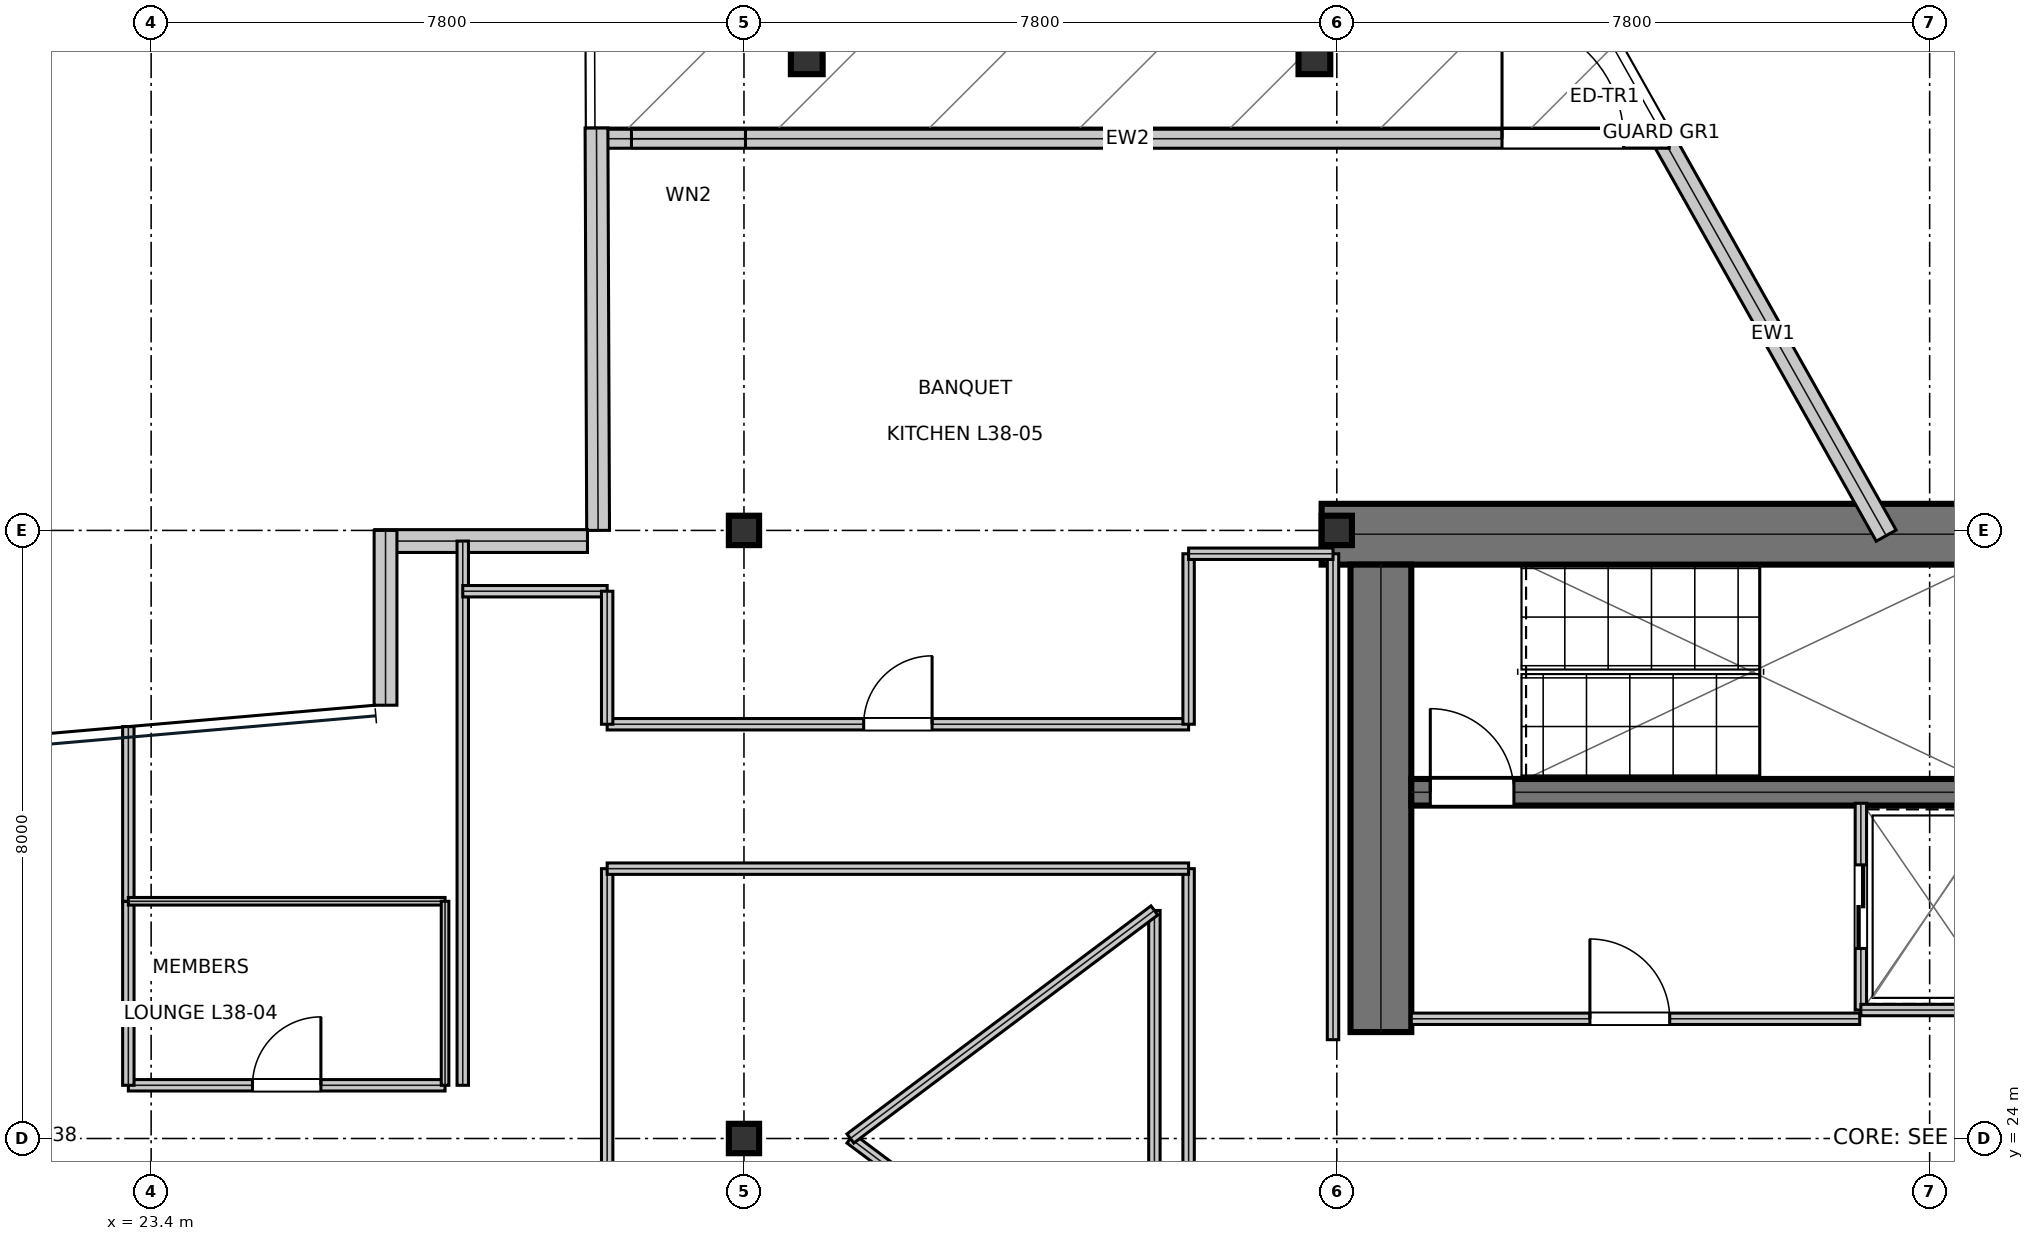
"""IFC4 building model, lengths in metres.
Left out: names, types, materials, properties, quantities, classifications, styles, units other than length and angle.
Written with IfcOpenShell. Run it as: python <this file> out.ifc"""

import sys

from ifc_helpers import new_model, si_unit, direction, frame, frame_2d, origin, origin_2d, place, context, subcontext, project, spatial, rectangle, i_section, extrude, element, fill, save


model = new_model("IFC4")
c1 = context("Model", 3, precision=1e-05, world=origin(), true_north=direction((0.0, 1.0)))
c2 = subcontext(c1, "Body", "Model", "MODEL_VIEW")
j1 = project(units=[si_unit("LENGTHUNIT", "METRE"), si_unit("PLANEANGLEUNIT", "RADIAN")], contexts=[c1])
p1 = place(None, origin())
s1 = spatial("IfcSite", under=j1, at=p1, CompositionType="ELEMENT")
p2 = place(p1, origin())
s2 = spatial("IfcBuilding", under=s1, at=p2, CompositionType="ELEMENT")
p3 = place(p2, frame((0.0, 0.0, 165.45)))
s3 = spatial("IfcBuildingStorey", under=s2, at=p3, CompositionType="ELEMENT", Elevation=165.45)
p4 = place(p3, frame((38.8, 31.95, 0.0), z_axis=(0.0, 0.0, 1.0), x_axis=(1.0, 0.0, 0.0)))
e1 = element("IfcWall", 1, at=p4, inside=s3, PredefinedType="SHEAR", context=c2, shape_type="SweptSolid", body=[
    extrude(rectangle(XDim=16.0, YDim=0.8, at=frame_2d((8.0, 0.0))), origin(), (0.0, 0.0, 1.0), 3.81),
])
p5 = place(p3, frame((39.58, 25.4, 0.0), z_axis=(0.0, 0.0, 1.0), x_axis=(0.0, 1.0, 0.0)))
e2 = element("IfcWall", 2, at=p5, inside=s3, PredefinedType="SHEAR", context=c2, shape_type="SweptSolid", body=[
    extrude(rectangle(XDim=6.15, YDim=0.8, at=frame_2d((3.075, 0.0))), origin(), (0.0, 0.0, 1.0), 3.81),
])
p6 = place(p3, frame((39.98, 28.555, 0.0), z_axis=(0.0, 0.0, 1.0), x_axis=(1.0, 0.0, 0.0)))
e3 = element("IfcWall", 3, at=p6, inside=s3, PredefinedType="SHEAR", context=c2, shape_type="SweptSolid", body=[
    extrude(rectangle(XDim=7.71, YDim=0.35, at=frame_2d((3.855, 0.0))), origin(), (0.0, 0.0, 1.0), 3.81),
])
p7 = place(p6, frame((0.25, 0.0, 0.0)))
e4 = element("IfcOpeningElement", 4, at=p7, cuts=e3, PredefinedType="OPENING", context=c2, shape_type="SweptSolid", body=[
    extrude(rectangle(XDim=1.1, YDim=2.15, at=frame_2d((0.55, 1.075))), frame((0.0, 0.185, 0.0), z_axis=(0.0, -1.0, 0.0), x_axis=(1.0, 0.0, 0.0)), (0.0, 0.0, 1.0), 0.37),
])
for number, where, z_axis, x_axis in (
    (5, (31.2, 24.0, 0.0), (0.0, 0.0, 1.0), (1.0, 0.0, 0.0)),
    (6, (31.2, 32.0, 0.0), (0.0, 0.0, 1.0), (1.0, 0.0, 0.0)),
    (7, (39.0, 32.0, 0.0), (0.0, 0.0, 1.0), (1.0, 0.0, 0.0)),
):
    element("IfcColumn", number, at=place(p3, frame(where, z_axis=z_axis, x_axis=x_axis)), inside=s3, PredefinedType="COLUMN", context=c2, shape_type="SweptSolid", body=[
        extrude(i_section(OverallWidth=0.398, OverallDepth=0.387, WebThickness=0.021, FlangeThickness=0.033, at=origin_2d()), origin(), (0.0, 0.0, 1.0), 4.044),
    ])
p8 = place(p3, frame((32.026, 38.23, 0.016), z_axis=(0.013968236766, -0.029819148922, 0.999457706318), x_axis=(0.905569653976, 0.424197597586, 0.0)))
e8 = element("IfcColumn", 8, at=p8, inside=s3, PredefinedType="COLUMN", context=c2, shape_type="SweptSolid", body=[
    extrude(i_section(OverallWidth=0.418, OverallDepth=0.455, WebThickness=0.042, FlangeThickness=0.068, at=origin_2d()), origin(), (0.0, 0.0, 1.0), 4.02),
])
p9 = place(p3, frame((38.705, 38.23, 0.016), z_axis=(-0.004980404192, -0.029821688517, 0.99954282673), x_axis=(0.986339577116, -0.164724735893, 0.0)))
e9 = element("IfcColumn", 9, at=p9, inside=s3, PredefinedType="COLUMN", context=c2, shape_type="SweptSolid", body=[
    extrude(i_section(OverallWidth=0.418, OverallDepth=0.455, WebThickness=0.042, FlangeThickness=0.068, at=origin_2d()), origin(), (0.0, 0.0, 1.0), 4.02),
])
p10 = place(p3, frame((46.228, 31.931, 0.0), z_axis=(0.0, 0.0, 1.0), x_axis=(-0.490139068903, 0.871644246889, 0.0)))
e10 = element("IfcWall", 10, at=p10, inside=s3, PredefinedType="STANDARD", context=c2, shape_type="SweptSolid", body=[
    extrude(rectangle(XDim=6.073, YDim=0.3, at=frame_2d((3.036, 0.0))), origin(), (0.0, 0.0, 1.0), 3.338),
])
p11 = place(p3, frame((43.374, 37.153, 0.0), z_axis=(0.0, 0.0, 1.0), x_axis=(-1.0, 0.0, 0.0)))
e11 = element("IfcWall", 11, at=p11, inside=s3, PredefinedType="STANDARD", context=c2, shape_type="SweptSolid", body=[
    extrude(rectangle(XDim=14.254, YDim=0.25, at=frame_2d((7.127, 0.0))), origin(), (0.0, 0.0, 1.0), 3.19),
])
p12 = place(p11, frame((0.6, 0.0, 0.0)))
e12 = element("IfcOpeningElement", 12, at=p12, cuts=e11, PredefinedType="OPENING", context=c2, shape_type="SweptSolid", body=[
    extrude(rectangle(XDim=1.6, YDim=2.2, at=frame_2d((0.8, 1.1))), frame((0.0, 0.135, 0.0), z_axis=(0.0, -1.0, 0.0), x_axis=(1.0, 0.0, 0.0)), (0.0, 0.0, 1.0), 0.27),
])
p13 = place(p11, frame((12.154, 0.0, 0.95)))
e13 = element("IfcOpeningElement", 13, at=p13, cuts=e11, PredefinedType="OPENING", context=c2, shape_type="SweptSolid", body=[
    extrude(rectangle(XDim=1.5, YDim=1.6, at=frame_2d((0.75, 0.8))), frame((0.0, 0.135, 0.0), z_axis=(0.0, -1.0, 0.0), x_axis=(1.0, 0.0, 0.0)), (0.0, 0.0, 1.0), 0.27),
])
p14 = place(p3, frame((29.26, 37.294, 0.0), z_axis=(0.0, 0.0, 1.0), x_axis=(0.004012697734, -0.999991949096, 0.0)))
e14 = element("IfcWall", 14, at=p14, inside=s3, PredefinedType="STANDARD", context=c2, shape_type="SweptSolid", body=[
    extrude(rectangle(XDim=5.293, YDim=0.3, at=frame_2d((2.646, 0.0))), origin(), (0.0, 0.0, 1.0), 3.81),
])
p15 = place(p3, frame((29.141, 31.86, 0.0), z_axis=(0.0, 0.0, 1.0), x_axis=(-1.0, 0.0, 0.0)))
e15 = element("IfcWall", 15, at=p15, inside=s3, PredefinedType="STANDARD", context=c2, shape_type="SweptSolid", body=[
    extrude(rectangle(XDim=2.797, YDim=0.3, at=frame_2d((1.398, 0.0))), origin(), (0.0, 0.0, 1.0), 3.81),
])
p16 = place(p3, frame((26.484, 32.0, 0.0), z_axis=(0.0, 0.0, 1.0), x_axis=(0.0, -1.0, 0.0)))
e16 = element("IfcWall", 16, at=p16, inside=s3, PredefinedType="STANDARD", context=c2, shape_type="SweptSolid", body=[
    extrude(rectangle(XDim=2.3, YDim=0.3, at=frame_2d((1.15, 0.0))), origin(), (0.0, 0.0, 1.0), 3.338),
])
p17 = place(p3, frame((39.98, 25.575, 0.0), z_axis=(0.0, 0.0, 1.0), x_axis=(1.0, 0.0, 0.0)))
e17 = element("IfcWall", 17, at=p17, inside=s3, PredefinedType="PARTITIONING", context=c2, shape_type="SweptSolid", body=[
    extrude(rectangle(XDim=5.9, YDim=0.15, at=frame_2d((2.95, 0.0))), origin(), (0.0, 0.0, 1.0), 3.81),
])
p18 = place(p17, frame((2.35, 0.0, 0.0)))
e18 = element("IfcOpeningElement", 18, at=p18, cuts=e17, PredefinedType="OPENING", context=c2, shape_type="SweptSolid", body=[
    extrude(rectangle(XDim=1.05, YDim=2.15, at=frame_2d((0.525, 1.075))), frame((0.0, 0.085, 0.0), z_axis=(0.0, -1.0, 0.0), x_axis=(1.0, 0.0, 0.0)), (0.0, 0.0, 1.0), 0.17),
])
p19 = place(p3, frame((45.895, 25.69, 0.0), z_axis=(0.0, 0.0, 1.0), x_axis=(0.0, 1.0, 0.0)))
e19 = element("IfcWall", 19, at=p19, inside=s3, PredefinedType="PARTITIONING", context=c2, shape_type="SweptSolid", body=[
    extrude(rectangle(XDim=2.72, YDim=0.15, at=frame_2d((1.36, 0.0))), origin(), (0.0, 0.0, 1.0), 3.81),
])
p20 = place(p19, frame((0.81, 0.0, 0.0)))
e20 = element("IfcOpeningElement", 20, at=p20, cuts=e19, PredefinedType="OPENING", context=c2, shape_type="SweptSolid", body=[
    extrude(rectangle(XDim=1.1, YDim=2.15, at=frame_2d((0.55, 1.075))), frame((0.0, 0.085, 0.0), z_axis=(0.0, -1.0, 0.0), x_axis=(1.0, 0.0, 0.0)), (0.0, 0.0, 1.0), 0.17),
])
p21 = place(p3, frame((45.895, 25.69, 0.0), z_axis=(0.0, 0.0, 1.0), x_axis=(1.0, 0.0, 0.0)))
e21 = element("IfcWall", 21, at=p21, inside=s3, PredefinedType="PARTITIONING", context=c2, shape_type="SweptSolid", body=[
    extrude(rectangle(XDim=1.915, YDim=0.15, at=frame_2d((0.958, 0.0))), origin(), (0.0, 0.0, 1.0), 3.81),
])
p22 = place(p3, frame((37.05, 14.5, 0.0), z_axis=(0.0, 0.0, 1.0), x_axis=(0.0, 1.0, 0.0)))
e22 = element("IfcWall", 22, at=p22, inside=s3, PredefinedType="PARTITIONING", context=c2, shape_type="SweptSolid", body=[
    extrude(rectangle(XDim=13.05, YDim=0.15, at=frame_2d((6.525, 0.0))), origin(), (0.0, 0.0, 1.0), 3.19),
])
p23 = place(p22, frame((4.635, 0.0, 0.0)))
e23 = element("IfcOpeningElement", 23, at=p23, cuts=e22, PredefinedType="OPENING", context=c2, shape_type="SweptSolid", body=[
    extrude(rectangle(XDim=0.9, YDim=2.15, at=frame_2d((0.45, 1.075))), frame((0.0, 0.085, 0.0), z_axis=(0.0, -1.0, 0.0), x_axis=(1.0, 0.0, 0.0)), (0.0, 0.0, 1.0), 0.17),
])
p24 = place(p3, frame((23.1, 24.7, 0.0), z_axis=(0.0, 0.0, 1.0), x_axis=(1.0, 0.0, 0.0)))
e24 = element("IfcWall", 24, at=p24, inside=s3, PredefinedType="PARTITIONING", context=c2, shape_type="SweptSolid", body=[
    extrude(rectangle(XDim=4.167, YDim=0.15, at=frame_2d((2.083, 0.0))), origin(), (0.0, 0.0, 1.0), 3.19),
])
p25 = place(p24, frame((1.634, 0.0, 0.0)))
e25 = element("IfcOpeningElement", 25, at=p25, cuts=e24, PredefinedType="OPENING", context=c2, shape_type="SweptSolid", body=[
    extrude(rectangle(XDim=0.9, YDim=2.15, at=frame_2d((0.45, 1.075))), frame((0.0, 0.085, 0.0), z_axis=(0.0, -1.0, 0.0), x_axis=(1.0, 0.0, 0.0)), (0.0, 0.0, 1.0), 0.17),
])
p26 = place(p3, frame((29.4, 29.45, 0.0), z_axis=(0.0, 0.0, 1.0), x_axis=(1.0, 0.0, 0.0)))
e26 = element("IfcWall", 26, at=p26, inside=s3, PredefinedType="PARTITIONING", context=c2, shape_type="SweptSolid", body=[
    extrude(rectangle(XDim=7.65, YDim=0.15, at=frame_2d((3.825, 0.0))), origin(), (0.0, 0.0, 1.0), 3.19),
])
p27 = place(p26, frame((3.375, 0.0, 0.0)))
e27 = element("IfcOpeningElement", 27, at=p27, cuts=e26, PredefinedType="OPENING", context=c2, shape_type="SweptSolid", body=[
    extrude(rectangle(XDim=0.9, YDim=2.15, at=frame_2d((0.45, 1.075))), frame((0.0, 0.085, 0.0), z_axis=(0.0, -1.0, 0.0), x_axis=(1.0, 0.0, 0.0)), (0.0, 0.0, 1.0), 0.17),
])
p28 = place(p3, frame((29.4, 16.8, 0.0), z_axis=(0.0, 0.0, 1.0), x_axis=(0.0, 1.0, 0.0)))
e28 = element("IfcWall", 28, at=p28, inside=s3, PredefinedType="PARTITIONING", context=c2, shape_type="SweptSolid", body=[
    extrude(rectangle(XDim=10.75, YDim=0.15, at=frame_2d((5.375, 0.0))), origin(), (0.0, 0.0, 1.0), 3.19),
])
p29 = place(p3, frame((29.4, 27.55, 0.0), z_axis=(0.0, 0.0, 1.0), x_axis=(1.0, 0.0, 0.0)))
e29 = element("IfcWall", 29, at=p29, inside=s3, PredefinedType="PARTITIONING", context=c2, shape_type="SweptSolid", body=[
    extrude(rectangle(XDim=7.65, YDim=0.15, at=frame_2d((3.825, 0.0))), origin(), (0.0, 0.0, 1.0), 3.19),
])
p30 = place(p3, frame((23.1, 24.7, 0.0), z_axis=(0.0, 0.0, 1.0), x_axis=(0.0, 1.0, 0.0)))
e30 = element("IfcWall", 30, at=p30, inside=s3, PredefinedType="PARTITIONING", context=c2, shape_type="SweptSolid", body=[
    extrude(rectangle(XDim=2.421, YDim=0.15, at=frame_2d((1.21, 0.0))), origin(), (0.0, 0.0, 1.0), 3.19),
])
p31 = place(p3, frame((27.5, 24.7, 0.0), z_axis=(0.0, 0.0, 1.0), x_axis=(0.0, 1.0, 0.0)))
e31 = element("IfcWall", 31, at=p31, inside=s3, PredefinedType="PARTITIONING", context=c2, shape_type="SweptSolid", body=[
    extrude(rectangle(XDim=7.16, YDim=0.15, at=frame_2d((3.58, 0.0))), origin(), (0.0, 0.0, 1.0), 3.338),
])
p32 = place(p3, frame((38.95, 25.3, 0.0), z_axis=(0.0, 0.0, 1.0), x_axis=(0.0, 1.0, 0.0)))
e32 = element("IfcWall", 32, at=p32, inside=s3, PredefinedType="PARTITIONING", context=c2, shape_type="SweptSolid", body=[
    extrude(rectangle(XDim=6.393, YDim=0.15, at=frame_2d((3.197, 0.0))), origin(), (0.0, 0.0, 1.0), 3.443),
])
p33 = place(p3, frame((23.1, 27.121, 0.0), z_axis=(0.0, 0.0, 1.0), x_axis=(0.0, 1.0, 0.0)))
e33 = element("IfcWall", 33, at=p33, inside=s3, PredefinedType="PARTITIONING", context=c2, shape_type="SweptSolid", body=[
    extrude(rectangle(XDim=2.298, YDim=0.15, at=frame_2d((1.149, 0.0))), origin(), (0.0, 0.0, 1.0), 3.81),
])
p34 = place(p3, frame((37.05, 29.45, 0.0), z_axis=(0.0, 0.0, 1.0), x_axis=(0.0, 1.0, 0.0)))
e34 = element("IfcWall", 34, at=p34, inside=s3, PredefinedType="PARTITIONING", context=c2, shape_type="SweptSolid", body=[
    extrude(rectangle(XDim=2.243, YDim=0.15, at=frame_2d((1.122, 0.0))), origin(), (0.0, 0.0, 1.0), 3.443),
])
p35 = place(p3, frame((37.05, 31.693, 0.0), z_axis=(0.0, 0.0, 1.0), x_axis=(1.0, 0.0, 0.0)))
e35 = element("IfcWall", 35, at=p35, inside=s3, PredefinedType="PARTITIONING", context=c2, shape_type="SweptSolid", body=[
    extrude(rectangle(XDim=1.9, YDim=0.15, at=frame_2d((0.95, 0.0))), origin(), (0.0, 0.0, 1.0), 3.81),
])
p36 = place(p3, frame((27.5, 31.2, 0.0), z_axis=(0.0, 0.0, 1.0), x_axis=(1.0, 0.0, 0.0)))
e36 = element("IfcWall", 36, at=p36, inside=s3, PredefinedType="PARTITIONING", context=c2, shape_type="SweptSolid", body=[
    extrude(rectangle(XDim=1.9, YDim=0.15, at=frame_2d((0.95, 0.0))), origin(), (0.0, 0.0, 1.0), 3.338),
])
p37 = place(p3, frame((29.4, 29.45, 0.0), z_axis=(0.0, 0.0, 1.0), x_axis=(0.0, 1.0, 0.0)))
e37 = element("IfcWall", 37, at=p37, inside=s3, PredefinedType="PARTITIONING", context=c2, shape_type="SweptSolid", body=[
    extrude(rectangle(XDim=1.75, YDim=0.15, at=frame_2d((0.875, 0.0))), origin(), (0.0, 0.0, 1.0), 3.81),
])
p38 = place(p3, frame((23.1, 27.121, 0.0), z_axis=(0.0, 0.0, 1.0), x_axis=(1.0, 0.0, 0.0)))
e38 = element("IfcWall", 38, at=p38, inside=s3, PredefinedType="PARTITIONING", context=c2, shape_type="SweptSolid", body=[
    extrude(rectangle(XDim=4.167, YDim=0.1, at=frame_2d((2.083, 0.0))), origin(), (0.0, 0.0, 1.0), 3.81),
])
p39 = place(p3, frame((27.267, 24.7, 0.0), z_axis=(0.0, 0.0, 1.0), x_axis=(0.0, 1.0, 0.0)))
e39 = element("IfcWall", 39, at=p39, inside=s3, PredefinedType="PARTITIONING", context=c2, shape_type="SweptSolid", body=[
    extrude(rectangle(XDim=2.421, YDim=0.1, at=frame_2d((1.21, 0.0))), origin(), (0.0, 0.0, 1.0), 3.81),
])
p40 = place(p3, frame((32.6, 24.0, 0.0), z_axis=(0.0, 0.0, 1.0), x_axis=(0.8, -0.6, 0.0)))
e40 = element("IfcWall", 40, at=p40, inside=s3, PredefinedType="MOVABLE", context=c2, shape_type="SweptSolid", body=[
    extrude(rectangle(XDim=5.0, YDim=0.15, at=frame_2d((2.5, 0.0))), origin(), (0.0, 0.0, 1.0), 3.81),
])
p41 = place(p3, frame((36.6, 21.0, 0.0), z_axis=(0.0, 0.0, 1.0), x_axis=(0.0, 1.0, 0.0)))
e41 = element("IfcWall", 41, at=p41, inside=s3, PredefinedType="MOVABLE", context=c2, shape_type="SweptSolid", body=[
    extrude(rectangle(XDim=6.0, YDim=0.15, at=frame_2d((3.0, 0.0))), origin(), (0.0, 0.0, 1.0), 3.81),
])
p42 = place(p3, frame((36.6, 27.0, 0.0), z_axis=(0.0, 0.0, 1.0), x_axis=(-0.8, -0.6, 0.0)))
e42 = element("IfcWall", 42, at=p42, inside=s3, PredefinedType="MOVABLE", context=c2, shape_type="SweptSolid", body=[
    extrude(rectangle(XDim=5.0, YDim=0.15, at=frame_2d((2.5, 0.0))), origin(), (0.0, 0.0, 1.0), 3.81),
])
p43 = place(p12, frame((1.6, 0.0, 0.0), z_axis=(0.0, 0.0, 1.0), x_axis=(-1.0, 0.0, 0.0)))
e43 = element("IfcDoor", 43, at=p43, inside=s3, OperationType="SINGLE_SWING_LEFT", PredefinedType="DOOR", context=c2, shape_type="SweptSolid", body=[
    extrude(rectangle(XDim=1.6, YDim=2.2, at=frame_2d((0.8, 1.1))), frame((0.0, 0.025, 0.0), z_axis=(0.0, -1.0, 0.0), x_axis=(1.0, 0.0, 0.0)), (0.0, 0.0, 1.0), 0.05),
])
fill(e12, e43)
p44 = place(p13, origin())
e44 = element("IfcWindow", 44, at=p44, inside=s3, PartitioningType="SINGLE_PANEL", PredefinedType="WINDOW", context=c2, shape_type="SweptSolid", body=[
    extrude(rectangle(XDim=1.5, YDim=1.6, at=frame_2d((0.75, 0.8))), frame((0.0, 0.03, 0.0), z_axis=(0.0, -1.0, 0.0), x_axis=(1.0, 0.0, 0.0)), (0.0, 0.0, 1.0), 0.06),
])
fill(e13, e44)
p45 = place(p18, origin())
e45 = element("IfcDoor", 45, at=p45, inside=s3, OperationType="SINGLE_SWING_LEFT", PredefinedType="DOOR", context=c2, shape_type="SweptSolid", body=[
    extrude(rectangle(XDim=1.05, YDim=2.15, at=frame_2d((0.525, 1.075))), frame((0.0, 0.025, 0.0), z_axis=(0.0, -1.0, 0.0), x_axis=(1.0, 0.0, 0.0)), (0.0, 0.0, 1.0), 0.05),
])
fill(e18, e45)
p46 = place(p20, frame((1.1, 0.0, 0.0), z_axis=(0.0, 0.0, 1.0), x_axis=(-1.0, 0.0, 0.0)))
e46 = element("IfcDoor", 46, at=p46, inside=s3, OperationType="DOUBLE_DOOR_SLIDING", PredefinedType="DOOR", context=c2, shape_type="SweptSolid", body=[
    extrude(rectangle(XDim=1.1, YDim=2.15, at=frame_2d((0.55, 1.075))), frame((0.0, 0.025, 0.0), z_axis=(0.0, -1.0, 0.0), x_axis=(1.0, 0.0, 0.0)), (0.0, 0.0, 1.0), 0.05),
])
fill(e20, e46)
p47 = place(p25, origin())
e47 = element("IfcDoor", 47, at=p47, inside=s3, OperationType="SINGLE_SWING_RIGHT", PredefinedType="DOOR", context=c2, shape_type="SweptSolid", body=[
    extrude(rectangle(XDim=0.9, YDim=2.15, at=frame_2d((0.45, 1.075))), frame((0.0, 0.025, 0.0), z_axis=(0.0, -1.0, 0.0), x_axis=(1.0, 0.0, 0.0)), (0.0, 0.0, 1.0), 0.05),
])
fill(e25, e47)
p48 = place(p27, origin())
e48 = element("IfcDoor", 48, at=p48, inside=s3, OperationType="SINGLE_SWING_RIGHT", PredefinedType="DOOR", context=c2, shape_type="SweptSolid", body=[
    extrude(rectangle(XDim=0.9, YDim=2.15, at=frame_2d((0.45, 1.075))), frame((0.0, 0.025, 0.0), z_axis=(0.0, -1.0, 0.0), x_axis=(1.0, 0.0, 0.0)), (0.0, 0.0, 1.0), 0.05),
])
fill(e27, e48)
p49 = place(p7, origin())
e49 = element("IfcDoor", 49, at=p49, inside=s3, OperationType="SINGLE_SWING_LEFT", PredefinedType="DOOR", context=c2, shape_type="SweptSolid", body=[
    extrude(rectangle(XDim=1.1, YDim=2.15, at=frame_2d((0.55, 1.075))), frame((0.0, 0.025, 0.0), z_axis=(0.0, -1.0, 0.0), x_axis=(1.0, 0.0, 0.0)), (0.0, 0.0, 1.0), 0.05),
])
fill(e4, e49)
save(model, sys.argv[1])
